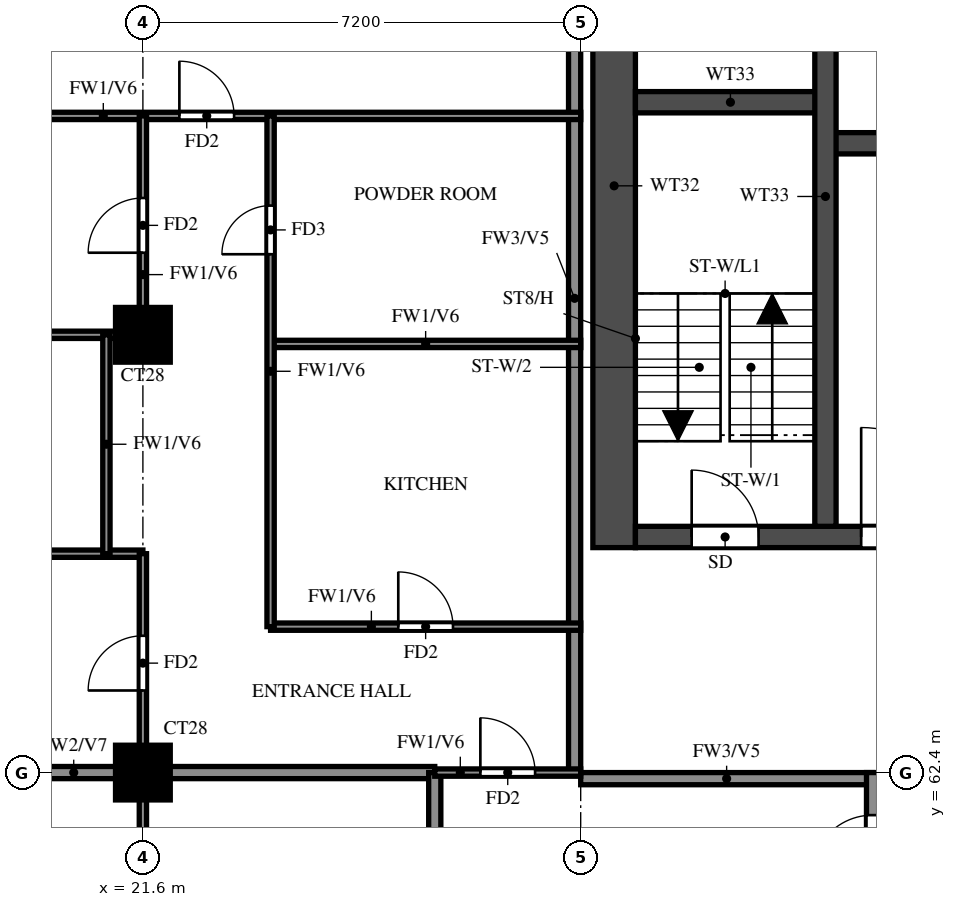
"""IFC4 building model, lengths in metres.
Left out: names, types, materials, properties, quantities, classifications, styles, units other than length and angle.
Written with IfcOpenShell. Run it as: python <this file> out.ifc"""

import sys

from ifc_helpers import new_model, si_unit, direction, frame, frame_2d, origin, origin_2d, place, context, subcontext, project, spatial, rectangle, extrude, source, transform, mapped, element, fill, save


model = new_model("IFC4")
c1 = context("Model", 3, precision=1e-05, world=origin(), true_north=direction((0.0, 1.0)))
c2 = subcontext(c1, "Body", "Model", "MODEL_VIEW")
j1 = project(units=[si_unit("LENGTHUNIT", "METRE"), si_unit("PLANEANGLEUNIT", "RADIAN")], contexts=[c1])
p1 = place(None, origin())
s1 = spatial("IfcSite", under=j1, at=p1, CompositionType="ELEMENT")
p2 = place(p1, origin())
s2 = spatial("IfcBuilding", under=s1, at=p2, CompositionType="ELEMENT")
p3 = place(p2, frame((0.0, 0.0, 202.5)))
s3 = spatial("IfcBuildingStorey", under=s2, at=p3, CompositionType="ELEMENT", Elevation=202.5)
m1 = source(origin(), c2, "Body", "SweptSolid", [
    extrude(rectangle(XDim=0.9, YDim=0.9, at=origin_2d()), origin(), (0.0, 0.0, 1.0), 3.1),
])
for number, where, z_axis, x_axis in (
    (1, (21.6, 62.4, 0.0), (0.0, 0.0, 1.0), (1.0, 0.0, 0.0)),
    (2, (21.6, 69.6, 0.0), (0.0, 0.0, 1.0), (1.0, 0.0, 0.0)),
):
    element("IfcColumn", number, at=place(p3, frame(where, z_axis=z_axis, x_axis=x_axis)), inside=s3, PredefinedType="COLUMN", context=c2, shape_type="MappedRepresentation", body=[
        mapped(m1, transform((0.0, 0.0, 0.0))),
    ])
p4 = place(p3, frame((29.35, 66.1, 0.0), z_axis=(0.0, 0.0, 1.0), x_axis=(0.0, 1.0, 0.0)))
e3 = element("IfcWall", 3, at=p4, inside=s3, PredefinedType="SHEAR", context=c2, shape_type="SweptSolid", body=[
    extrude(rectangle(XDim=11.9, YDim=0.7, at=frame_2d((5.95, 0.0))), origin(), (0.0, 0.0, 1.0), 3.1),
])
p5 = place(p3, frame((29.7, 66.275, 0.0), z_axis=(0.0, 0.0, 1.0), x_axis=(1.0, 0.0, 0.0)))
e4 = element("IfcWall", 4, at=p5, inside=s3, PredefinedType="SHEAR", context=c2, shape_type="SweptSolid", body=[
    extrude(rectangle(XDim=41.4, YDim=0.35, at=frame_2d((20.7, 0.0))), origin(), (0.0, 0.0, 1.0), 3.1),
])
p6 = place(p5, frame((0.925, 0.0, 0.0)))
e5 = element("IfcOpeningElement", 5, at=p6, cuts=e4, PredefinedType="OPENING", context=c2, shape_type="SweptSolid", body=[
    extrude(rectangle(XDim=1.1, YDim=2.1, at=frame_2d((0.55, 1.05))), frame((0.0, 0.185, 0.0), z_axis=(0.0, -1.0, 0.0), x_axis=(1.0, 0.0, 0.0)), (0.0, 0.0, 1.0), 0.37),
])
p7 = place(p5, frame((3.712, 0.0, 0.0)))
e6 = element("IfcOpeningElement", 6, at=p7, cuts=e4, PredefinedType="OPENING", context=c2, shape_type="SweptSolid", body=[
    extrude(rectangle(XDim=1.8, YDim=2.1, at=frame_2d((0.9, 1.05))), frame((0.0, 0.185, 0.0), z_axis=(0.0, -1.0, 0.0), x_axis=(1.0, 0.0, 0.0)), (0.0, 0.0, 1.0), 0.37),
])
p8 = place(p3, frame((32.825, 72.75, 0.0), z_axis=(0.0, 0.0, 1.0), x_axis=(1.0, 0.0, 0.0)))
e7 = element("IfcWall", 7, at=p8, inside=s3, PredefinedType="SHEAR", context=c2, shape_type="SweptSolid", body=[
    extrude(rectangle(XDim=35.15, YDim=0.35, at=frame_2d((17.575, 0.0))), origin(), (0.0, 0.0, 1.0), 3.1),
])
p9 = place(p8, frame((19.8, 0.0, 0.0)))
e8 = element("IfcOpeningElement", 8, at=p9, cuts=e7, PredefinedType="OPENING", context=c2, shape_type="SweptSolid", body=[
    extrude(rectangle(XDim=1.1, YDim=2.1, at=frame_2d((0.55, 1.05))), frame((0.0, 0.185, 0.0), z_axis=(0.0, -1.0, 0.0), x_axis=(1.0, 0.0, 0.0)), (0.0, 0.0, 1.0), 0.37),
])
p10 = place(p8, frame((27.7, 0.0, 0.0)))
e9 = element("IfcOpeningElement", 9, at=p10, cuts=e7, PredefinedType="OPENING", context=c2, shape_type="SweptSolid", body=[
    extrude(rectangle(XDim=1.1, YDim=2.1, at=frame_2d((0.55, 1.05))), frame((0.0, 0.185, 0.0), z_axis=(0.0, -1.0, 0.0), x_axis=(1.0, 0.0, 0.0)), (0.0, 0.0, 1.0), 0.37),
])
p11 = place(p8, frame((30.3, 0.0, 0.0)))
e10 = element("IfcOpeningElement", 10, at=p11, cuts=e7, PredefinedType="OPENING", context=c2, shape_type="SweptSolid", body=[
    extrude(rectangle(XDim=1.1, YDim=2.1, at=frame_2d((0.55, 1.05))), frame((0.0, 0.185, 0.0), z_axis=(0.0, -1.0, 0.0), x_axis=(1.0, 0.0, 0.0)), (0.0, 0.0, 1.0), 0.37),
])
p12 = place(p8, frame((3.8, 0.0, 0.0)))
e11 = element("IfcOpeningElement", 11, at=p12, cuts=e7, PredefinedType="OPENING", context=c2, shape_type="SweptSolid", body=[
    extrude(rectangle(XDim=1.1, YDim=2.1, at=frame_2d((0.55, 1.05))), frame((0.0, 0.185, 0.0), z_axis=(0.0, -1.0, 0.0), x_axis=(1.0, 0.0, 0.0)), (0.0, 0.0, 1.0), 0.37),
])
p13 = place(p8, frame((6.55, 0.0, 0.0)))
e12 = element("IfcOpeningElement", 12, at=p13, cuts=e7, PredefinedType="OPENING", context=c2, shape_type="SweptSolid", body=[
    extrude(rectangle(XDim=1.1, YDim=2.1, at=frame_2d((0.55, 1.05))), frame((0.0, 0.185, 0.0), z_axis=(0.0, -1.0, 0.0), x_axis=(1.0, 0.0, 0.0)), (0.0, 0.0, 1.0), 0.37),
])
p14 = place(p8, frame((9.3, 0.0, 0.0)))
e13 = element("IfcOpeningElement", 13, at=p14, cuts=e7, PredefinedType="OPENING", context=c2, shape_type="SweptSolid", body=[
    extrude(rectangle(XDim=1.1, YDim=2.1, at=frame_2d((0.55, 1.05))), frame((0.0, 0.185, 0.0), z_axis=(0.0, -1.0, 0.0), x_axis=(1.0, 0.0, 0.0)), (0.0, 0.0, 1.0), 0.37),
])
p15 = place(p8, frame((12.05, 0.0, 0.0)))
e14 = element("IfcOpeningElement", 14, at=p15, cuts=e7, PredefinedType="OPENING", context=c2, shape_type="SweptSolid", body=[
    extrude(rectangle(XDim=1.1, YDim=2.1, at=frame_2d((0.55, 1.05))), frame((0.0, 0.185, 0.0), z_axis=(0.0, -1.0, 0.0), x_axis=(1.0, 0.0, 0.0)), (0.0, 0.0, 1.0), 0.37),
])
p16 = place(p8, frame((14.8, 0.0, 0.0)))
e15 = element("IfcOpeningElement", 15, at=p16, cuts=e7, PredefinedType="OPENING", context=c2, shape_type="SweptSolid", body=[
    extrude(rectangle(XDim=1.1, YDim=2.1, at=frame_2d((0.55, 1.05))), frame((0.0, 0.185, 0.0), z_axis=(0.0, -1.0, 0.0), x_axis=(1.0, 0.0, 0.0)), (0.0, 0.0, 1.0), 0.37),
])
p17 = place(p8, frame((17.55, 0.0, 0.0)))
e16 = element("IfcOpeningElement", 16, at=p17, cuts=e7, PredefinedType="OPENING", context=c2, shape_type="SweptSolid", body=[
    extrude(rectangle(XDim=1.1, YDim=2.1, at=frame_2d((0.55, 1.05))), frame((0.0, 0.185, 0.0), z_axis=(0.0, -1.0, 0.0), x_axis=(1.0, 0.0, 0.0)), (0.0, 0.0, 1.0), 0.37),
])
p18 = place(p8, frame((0.938, 0.0, 0.0)))
e17 = element("IfcOpeningElement", 17, at=p18, cuts=e7, PredefinedType="OPENING", context=c2, shape_type="SweptSolid", body=[
    extrude(rectangle(XDim=1.1, YDim=2.1, at=frame_2d((0.55, 1.05))), frame((0.0, 0.185, 0.0), z_axis=(0.0, -1.0, 0.0), x_axis=(1.0, 0.0, 0.0)), (0.0, 0.0, 1.0), 0.37),
])
p19 = place(p3, frame((29.7, 73.425, 0.0), z_axis=(0.0, 0.0, 1.0), x_axis=(1.0, 0.0, 0.0)))
e18 = element("IfcWall", 18, at=p19, inside=s3, PredefinedType="SHEAR", context=c2, shape_type="SweptSolid", body=[
    extrude(rectangle(XDim=3.125, YDim=0.35, at=frame_2d((1.562, 0.0))), origin(), (0.0, 0.0, 1.0), 3.1),
])
p20 = place(p3, frame((32.825, 66.45, 0.0), z_axis=(0.0, 0.0, 1.0), x_axis=(0.0, 1.0, 0.0)))
e19 = element("IfcWall", 19, at=p20, inside=s3, PredefinedType="SHEAR", context=c2, shape_type="SweptSolid", body=[
    extrude(rectangle(XDim=10.85, YDim=0.35, at=frame_2d((5.425, 0.0))), origin(), (0.0, 0.0, 1.0), 3.1),
])
p21 = place(p3, frame((28.8, 62.3, 0.0), z_axis=(0.0, 0.0, 1.0), x_axis=(1.0, 0.0, 0.0)))
e20 = element("IfcWall", 20, at=p21, inside=s3, PredefinedType="SOLIDWALL", context=c2, shape_type="SweptSolid", body=[
    extrude(rectangle(XDim=4.8, YDim=0.2, at=frame_2d((2.4, 0.0))), origin(), (0.0, 0.0, 1.0), 3.1),
])
p22 = place(p3, frame((28.7, 62.4, 0.0), z_axis=(0.0, 0.0, 1.0), x_axis=(0.0, 1.0, 0.0)))
e21 = element("IfcWall", 21, at=p22, inside=s3, PredefinedType="SOLIDWALL", context=c2, shape_type="SweptSolid", body=[
    extrude(rectangle(XDim=15.6, YDim=0.2, at=frame_2d((7.8, 0.0))), origin(), (0.0, 0.0, 1.0), 3.1),
])
p23 = place(p3, frame((33.6, 45.6, 0.0), z_axis=(0.0, 0.0, 1.0), x_axis=(0.0, 1.0, 0.0)))
e22 = element("IfcWall", 22, at=p23, inside=s3, PredefinedType="SOLIDWALL", context=c2, shape_type="SweptSolid", body=[
    extrude(rectangle(XDim=16.8, YDim=0.2, at=frame_2d((8.4, 0.0))), origin(), (0.0, 0.0, 1.0), 3.1),
])
p24 = place(p23, frame((0.7, 0.0, 0.0)))
e23 = element("IfcOpeningElement", 23, at=p24, cuts=e22, PredefinedType="OPENING", context=c2, shape_type="SweptSolid", body=[
    extrude(rectangle(XDim=1.0, YDim=2.1, at=frame_2d((0.5, 1.05))), frame((0.0, 0.11, 0.0), z_axis=(0.0, -1.0, 0.0), x_axis=(1.0, 0.0, 0.0)), (0.0, 0.0, 1.0), 0.22),
])
p25 = place(p23, frame((8.3, 0.0, 0.0)))
e24 = element("IfcOpeningElement", 24, at=p25, cuts=e22, PredefinedType="OPENING", context=c2, shape_type="SweptSolid", body=[
    extrude(rectangle(XDim=1.0, YDim=2.1, at=frame_2d((0.5, 1.05))), frame((0.0, 0.11, 0.0), z_axis=(0.0, -1.0, 0.0), x_axis=(1.0, 0.0, 0.0)), (0.0, 0.0, 1.0), 0.22),
])
p26 = place(p23, frame((15.1, 0.0, 0.0)))
e25 = element("IfcOpeningElement", 25, at=p26, cuts=e22, PredefinedType="OPENING", context=c2, shape_type="SweptSolid", body=[
    extrude(rectangle(XDim=1.0, YDim=2.1, at=frame_2d((0.5, 1.05))), frame((0.0, 0.11, 0.0), z_axis=(0.0, -1.0, 0.0), x_axis=(1.0, 0.0, 0.0)), (0.0, 0.0, 1.0), 0.22),
])
p27 = place(p3, frame((14.525, 62.4, 0.0), z_axis=(0.0, 0.0, 1.0), x_axis=(1.0, 0.0, 0.0)))
e26 = element("IfcWall", 26, at=p27, inside=s3, PredefinedType="SOLIDWALL", context=c2, shape_type="SweptSolid", body=[
    extrude(rectangle(XDim=11.875, YDim=0.2, at=frame_2d((5.938, 0.0))), origin(), (0.0, 0.0, 1.0), 3.1),
])
p28 = place(p3, frame((26.4, 60.0, 0.0), z_axis=(0.0, 0.0, 1.0), x_axis=(0.0, 1.0, 0.0)))
e27 = element("IfcWall", 27, at=p28, inside=s3, PredefinedType="SOLIDWALL", context=c2, shape_type="SweptSolid", body=[
    extrude(rectangle(XDim=2.4, YDim=0.2, at=frame_2d((1.2, 0.0))), origin(), (0.0, 0.0, 1.0), 3.1),
])
p29 = place(p3, frame((26.4, 62.4, 0.0), z_axis=(0.0, 0.0, 1.0), x_axis=(1.0, 0.0, 0.0)))
e28 = element("IfcWall", 28, at=p29, inside=s3, PredefinedType="PARTITIONING", context=c2, shape_type="SweptSolid", body=[
    extrude(rectangle(XDim=2.4, YDim=0.12, at=frame_2d((1.2, 0.0))), origin(), (0.0, 0.0, 1.0), 3.1),
])
p30 = place(p29, frame((0.75, 0.0, 0.0)))
e29 = element("IfcOpeningElement", 29, at=p30, cuts=e28, PredefinedType="OPENING", context=c2, shape_type="SweptSolid", body=[
    extrude(rectangle(XDim=0.9, YDim=2.1, at=frame_2d((0.45, 1.05))), frame((0.0, 0.07, 0.0), z_axis=(0.0, -1.0, 0.0), x_axis=(1.0, 0.0, 0.0)), (0.0, 0.0, 1.0), 0.14),
])
p31 = place(p3, frame((23.7, 64.8, 0.0), z_axis=(0.0, 0.0, 1.0), x_axis=(1.0, 0.0, 0.0)))
e30 = element("IfcWall", 30, at=p31, inside=s3, PredefinedType="PARTITIONING", context=c2, shape_type="SweptSolid", body=[
    extrude(rectangle(XDim=5.1, YDim=0.12, at=frame_2d((2.55, 0.0))), origin(), (0.0, 0.0, 1.0), 3.1),
])
p32 = place(p31, frame((2.1, 0.0, 0.0)))
e31 = element("IfcOpeningElement", 31, at=p32, cuts=e30, PredefinedType="OPENING", context=c2, shape_type="SweptSolid", body=[
    extrude(rectangle(XDim=0.9, YDim=2.1, at=frame_2d((0.45, 1.05))), frame((0.0, 0.07, 0.0), z_axis=(0.0, -1.0, 0.0), x_axis=(1.0, 0.0, 0.0)), (0.0, 0.0, 1.0), 0.14),
])
p33 = place(p3, frame((14.525, 66.0, 0.0), z_axis=(0.0, 0.0, 1.0), x_axis=(1.0, 0.0, 0.0)))
e32 = element("IfcWall", 32, at=p33, inside=s3, PredefinedType="PARTITIONING", context=c2, shape_type="SweptSolid", body=[
    extrude(rectangle(XDim=7.075, YDim=0.12, at=frame_2d((3.538, 0.0))), origin(), (0.0, 0.0, 1.0), 3.1),
])
p34 = place(p33, frame((2.837, 0.0, 0.0)))
e33 = element("IfcOpeningElement", 33, at=p34, cuts=e32, PredefinedType="OPENING", context=c2, shape_type="SweptSolid", body=[
    extrude(rectangle(XDim=0.8, YDim=2.1, at=frame_2d((0.4, 1.05))), frame((0.0, 0.07, 0.0), z_axis=(0.0, -1.0, 0.0), x_axis=(1.0, 0.0, 0.0)), (0.0, 0.0, 1.0), 0.14),
])
p35 = place(p3, frame((23.7, 69.45, 0.0), z_axis=(0.0, 0.0, 1.0), x_axis=(1.0, 0.0, 0.0)))
e34 = element("IfcWall", 34, at=p35, inside=s3, PredefinedType="PARTITIONING", context=c2, shape_type="SweptSolid", body=[
    extrude(rectangle(XDim=5.1, YDim=0.12, at=frame_2d((2.55, 0.0))), origin(), (0.0, 0.0, 1.0), 3.1),
])
p36 = place(p3, frame((14.525, 69.6, 0.0), z_axis=(0.0, 0.0, 1.0), x_axis=(1.0, 0.0, 0.0)))
e35 = element("IfcWall", 35, at=p36, inside=s3, PredefinedType="PARTITIONING", context=c2, shape_type="SweptSolid", body=[
    extrude(rectangle(XDim=7.075, YDim=0.12, at=frame_2d((3.538, 0.0))), origin(), (0.0, 0.0, 1.0), 3.1),
])
p37 = place(p3, frame((14.525, 73.2, 0.0), z_axis=(0.0, 0.0, 1.0), x_axis=(1.0, 0.0, 0.0)))
e36 = element("IfcWall", 36, at=p37, inside=s3, PredefinedType="PARTITIONING", context=c2, shape_type="SweptSolid", body=[
    extrude(rectangle(XDim=14.275, YDim=0.12, at=frame_2d((7.138, 0.0))), origin(), (0.0, 0.0, 1.0), 3.1),
])
p38 = place(p37, frame((7.675, 0.0, 0.0)))
e37 = element("IfcOpeningElement", 37, at=p38, cuts=e36, PredefinedType="OPENING", context=c2, shape_type="SweptSolid", body=[
    extrude(rectangle(XDim=0.9, YDim=2.1, at=frame_2d((0.45, 1.05))), frame((0.0, 0.07, 0.0), z_axis=(0.0, -1.0, 0.0), x_axis=(1.0, 0.0, 0.0)), (0.0, 0.0, 1.0), 0.14),
])
p39 = place(p3, frame((21.0, 66.0, 0.0), z_axis=(0.0, 0.0, 1.0), x_axis=(0.0, 1.0, 0.0)))
e38 = element("IfcWall", 38, at=p39, inside=s3, PredefinedType="PARTITIONING", context=c2, shape_type="SweptSolid", body=[
    extrude(rectangle(XDim=3.6, YDim=0.12, at=frame_2d((1.8, 0.0))), origin(), (0.0, 0.0, 1.0), 3.1),
])
p40 = place(p3, frame((21.6, 48.0, 0.0), z_axis=(0.0, 0.0, 1.0), x_axis=(0.0, 1.0, 0.0)))
e39 = element("IfcWall", 39, at=p40, inside=s3, PredefinedType="PARTITIONING", context=c2, shape_type="SweptSolid", body=[
    extrude(rectangle(XDim=18.0, YDim=0.12, at=frame_2d((9.0, 0.0))), origin(), (0.0, 0.0, 1.0), 3.1),
])
p41 = place(p40, frame((1.35, 0.0, 0.0)))
e40 = element("IfcOpeningElement", 40, at=p41, cuts=e39, PredefinedType="OPENING", context=c2, shape_type="SweptSolid", body=[
    extrude(rectangle(XDim=0.9, YDim=2.1, at=frame_2d((0.45, 1.05))), frame((0.0, 0.07, 0.0), z_axis=(0.0, -1.0, 0.0), x_axis=(1.0, 0.0, 0.0)), (0.0, 0.0, 1.0), 0.14),
])
p42 = place(p40, frame((7.95, 0.0, 0.0)))
e41 = element("IfcOpeningElement", 41, at=p42, cuts=e39, PredefinedType="OPENING", context=c2, shape_type="SweptSolid", body=[
    extrude(rectangle(XDim=1.5, YDim=2.1, at=frame_2d((0.75, 1.05))), frame((0.0, 0.07, 0.0), z_axis=(0.0, -1.0, 0.0), x_axis=(1.0, 0.0, 0.0)), (0.0, 0.0, 1.0), 0.14),
])
p43 = place(p40, frame((12.15, 0.0, 0.0)))
e42 = element("IfcOpeningElement", 42, at=p43, cuts=e39, PredefinedType="OPENING", context=c2, shape_type="SweptSolid", body=[
    extrude(rectangle(XDim=0.9, YDim=2.1, at=frame_2d((0.45, 1.05))), frame((0.0, 0.07, 0.0), z_axis=(0.0, -1.0, 0.0), x_axis=(1.0, 0.0, 0.0)), (0.0, 0.0, 1.0), 0.14),
])
p44 = place(p40, frame((15.75, 0.0, 0.0)))
e43 = element("IfcOpeningElement", 43, at=p44, cuts=e39, PredefinedType="OPENING", context=c2, shape_type="SweptSolid", body=[
    extrude(rectangle(XDim=0.9, YDim=2.1, at=frame_2d((0.45, 1.05))), frame((0.0, 0.07, 0.0), z_axis=(0.0, -1.0, 0.0), x_axis=(1.0, 0.0, 0.0)), (0.0, 0.0, 1.0), 0.14),
])
p45 = place(p3, frame((21.6, 69.6, 0.0), z_axis=(0.0, 0.0, 1.0), x_axis=(0.0, 1.0, 0.0)))
e44 = element("IfcWall", 44, at=p45, inside=s3, PredefinedType="PARTITIONING", context=c2, shape_type="SweptSolid", body=[
    extrude(rectangle(XDim=3.6, YDim=0.12, at=frame_2d((1.8, 0.0))), origin(), (0.0, 0.0, 1.0), 3.1),
])
p46 = place(p45, frame((1.35, 0.0, 0.0)))
e45 = element("IfcOpeningElement", 45, at=p46, cuts=e44, PredefinedType="OPENING", context=c2, shape_type="SweptSolid", body=[
    extrude(rectangle(XDim=0.9, YDim=2.1, at=frame_2d((0.45, 1.05))), frame((0.0, 0.07, 0.0), z_axis=(0.0, -1.0, 0.0), x_axis=(1.0, 0.0, 0.0)), (0.0, 0.0, 1.0), 0.14),
])
p47 = place(p3, frame((23.7, 64.8, 0.0), z_axis=(0.0, 0.0, 1.0), x_axis=(0.0, 1.0, 0.0)))
e46 = element("IfcWall", 46, at=p47, inside=s3, PredefinedType="PARTITIONING", context=c2, shape_type="SweptSolid", body=[
    extrude(rectangle(XDim=8.4, YDim=0.12, at=frame_2d((4.2, 0.0))), origin(), (0.0, 0.0, 1.0), 3.1),
])
p48 = place(p47, frame((6.125, 0.0, 0.0)))
e47 = element("IfcOpeningElement", 47, at=p48, cuts=e46, PredefinedType="OPENING", context=c2, shape_type="SweptSolid", body=[
    extrude(rectangle(XDim=0.8, YDim=2.1, at=frame_2d((0.4, 1.05))), frame((0.0, 0.07, 0.0), z_axis=(0.0, -1.0, 0.0), x_axis=(1.0, 0.0, 0.0)), (0.0, 0.0, 1.0), 0.14),
])
p49 = place(p6, origin())
e48 = element("IfcDoor", 48, at=p49, inside=s3, OperationType="SINGLE_SWING_LEFT", PredefinedType="DOOR", context=c2, shape_type="SweptSolid", body=[
    extrude(rectangle(XDim=1.1, YDim=2.1, at=frame_2d((0.55, 1.05))), frame((0.0, 0.025, 0.0), z_axis=(0.0, -1.0, 0.0), x_axis=(1.0, 0.0, 0.0)), (0.0, 0.0, 1.0), 0.05),
])
fill(e5, e48)
p50 = place(p7, origin())
e49 = element("IfcDoor", 49, at=p50, inside=s3, OperationType="DOUBLE_DOOR_SINGLE_SWING", PredefinedType="DOOR", context=c2, shape_type="SweptSolid", body=[
    extrude(rectangle(XDim=1.8, YDim=2.1, at=frame_2d((0.9, 1.05))), frame((0.0, 0.025, 0.0), z_axis=(0.0, -1.0, 0.0), x_axis=(1.0, 0.0, 0.0)), (0.0, 0.0, 1.0), 0.05),
])
fill(e6, e49)
p51 = place(p30, origin())
e50 = element("IfcDoor", 50, at=p51, inside=s3, OperationType="SINGLE_SWING_LEFT", PredefinedType="DOOR", context=c2, shape_type="SweptSolid", body=[
    extrude(rectangle(XDim=0.9, YDim=2.1, at=frame_2d((0.45, 1.05))), frame((0.0, 0.025, 0.0), z_axis=(0.0, -1.0, 0.0), x_axis=(1.0, 0.0, 0.0)), (0.0, 0.0, 1.0), 0.05),
])
fill(e29, e50)
p52 = place(p26, origin())
e51 = element("IfcDoor", 51, at=p52, inside=s3, OperationType="SINGLE_SWING_RIGHT", PredefinedType="DOOR", context=c2, shape_type="SweptSolid", body=[
    extrude(rectangle(XDim=1.0, YDim=2.1, at=frame_2d((0.5, 1.05))), frame((0.0, 0.025, 0.0), z_axis=(0.0, -1.0, 0.0), x_axis=(1.0, 0.0, 0.0)), (0.0, 0.0, 1.0), 0.05),
])
fill(e25, e51)
p53 = place(p44, origin())
e52 = element("IfcDoor", 52, at=p53, inside=s3, OperationType="SINGLE_SWING_LEFT", PredefinedType="DOOR", context=c2, shape_type="SweptSolid", body=[
    extrude(rectangle(XDim=0.9, YDim=2.1, at=frame_2d((0.45, 1.05))), frame((0.0, 0.025, 0.0), z_axis=(0.0, -1.0, 0.0), x_axis=(1.0, 0.0, 0.0)), (0.0, 0.0, 1.0), 0.05),
])
fill(e43, e52)
p54 = place(p46, origin())
e53 = element("IfcDoor", 53, at=p54, inside=s3, OperationType="SINGLE_SWING_RIGHT", PredefinedType="DOOR", context=c2, shape_type="SweptSolid", body=[
    extrude(rectangle(XDim=0.9, YDim=2.1, at=frame_2d((0.45, 1.05))), frame((0.0, 0.025, 0.0), z_axis=(0.0, -1.0, 0.0), x_axis=(1.0, 0.0, 0.0)), (0.0, 0.0, 1.0), 0.05),
])
fill(e45, e53)
p55 = place(p38, origin())
e54 = element("IfcDoor", 54, at=p55, inside=s3, OperationType="SINGLE_SWING_LEFT", PredefinedType="DOOR", context=c2, shape_type="SweptSolid", body=[
    extrude(rectangle(XDim=0.9, YDim=2.1, at=frame_2d((0.45, 1.05))), frame((0.0, 0.025, 0.0), z_axis=(0.0, -1.0, 0.0), x_axis=(1.0, 0.0, 0.0)), (0.0, 0.0, 1.0), 0.05),
])
fill(e37, e54)
p56 = place(p32, origin())
e55 = element("IfcDoor", 55, at=p56, inside=s3, OperationType="SINGLE_SWING_LEFT", PredefinedType="DOOR", context=c2, shape_type="SweptSolid", body=[
    extrude(rectangle(XDim=0.9, YDim=2.1, at=frame_2d((0.45, 1.05))), frame((0.0, 0.025, 0.0), z_axis=(0.0, -1.0, 0.0), x_axis=(1.0, 0.0, 0.0)), (0.0, 0.0, 1.0), 0.05),
])
fill(e31, e55)
p57 = place(p48, origin())
e56 = element("IfcDoor", 56, at=p57, inside=s3, OperationType="SINGLE_SWING_RIGHT", PredefinedType="DOOR", context=c2, shape_type="SweptSolid", body=[
    extrude(rectangle(XDim=0.8, YDim=2.1, at=frame_2d((0.4, 1.05))), frame((0.0, 0.025, 0.0), z_axis=(0.0, -1.0, 0.0), x_axis=(1.0, 0.0, 0.0)), (0.0, 0.0, 1.0), 0.05),
])
fill(e47, e56)
save(model, sys.argv[1])
